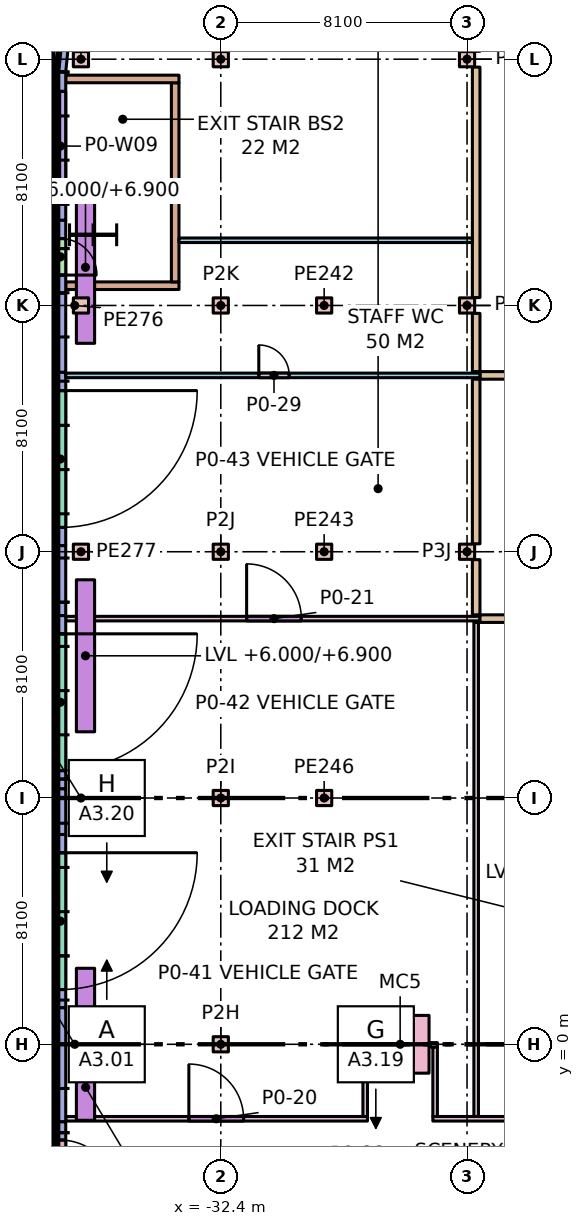
"""IFC4 building model, lengths in metres.
Left out: names, types, materials, properties, quantities, classifications, styles, units other than length and angle.
Written with IfcOpenShell. Run it as: python <this file> out.ifc"""

import sys

from ifc_helpers import new_model, si_unit, direction, frame, frame_2d, origin, origin_2d, place, context, subcontext, project, spatial, rectangle, extrude, element, fill, save


model = new_model("IFC4")
c1 = context("Model", 3, precision=1e-05, world=origin(), true_north=direction((0.0, 1.0)))
c2 = subcontext(c1, "Body", "Model", "MODEL_VIEW")
j1 = project(units=[si_unit("LENGTHUNIT", "METRE"), si_unit("PLANEANGLEUNIT", "RADIAN")], contexts=[c1])
p1 = place(None, origin())
s1 = spatial("IfcSite", under=j1, at=p1, CompositionType="ELEMENT")
p2 = place(p1, origin())
s2 = spatial("IfcBuilding", under=s1, at=p2, CompositionType="ELEMENT")
p3 = place(p2, origin())
s3 = spatial("IfcBuildingStorey", under=s2, at=p3, CompositionType="ELEMENT", Elevation=0.0)
for number, where, z_axis, x_axis in (
    (1, (-32.4, 0.0, 0.0), (0.0, 0.0, 1.0), (1.0, 0.0, 0.0)),
    (2, (-32.4, 8.1, 0.0), (0.0, 0.0, 1.0), (1.0, 0.0, 0.0)),
    (3, (-32.4, 16.2, 0.0), (0.0, 0.0, 1.0), (1.0, 0.0, 0.0)),
    (4, (-32.4, 24.3, 0.0), (0.0, 0.0, 1.0), (1.0, 0.0, 0.0)),
    (5, (-32.4, 32.4, 0.0), (0.0, 0.0, 1.0), (1.0, 0.0, 0.0)),
    (6, (-24.3, 16.2, 0.0), (0.0, 0.0, 1.0), (1.0, 0.0, 0.0)),
    (7, (-24.3, 24.3, 0.0), (0.0, 0.0, 1.0), (1.0, 0.0, 0.0)),
    (8, (-24.3, 32.4, 0.0), (0.0, 0.0, 1.0), (1.0, 0.0, 0.0)),
    (9, (-29.0, 24.3, 0.0), (0.0, 0.0, 1.0), (1.0, 0.0, 0.0)),
    (10, (-29.0, 16.2, 0.0), (0.0, 0.0, 1.0), (1.0, 0.0, 0.0)),
    (11, (-29.0, 8.1, 0.0), (0.0, 0.0, 1.0), (1.0, 0.0, 0.0)),
    (12, (-37.0, 24.3, 0.0), (0.0, 0.0, 1.0), (1.0, 0.0, 0.0)),
    (13, (-37.0, 16.2, 0.0), (0.0, 0.0, 1.0), (1.0, 0.0, 0.0)),
    (14, (-37.0, 8.1, 0.0), (0.0, 0.0, 1.0), (1.0, 0.0, 0.0)),
    (15, (-37.0, 0.0, 0.0), (0.0, 0.0, 1.0), (1.0, 0.0, 0.0)),
    (16, (-37.0, 32.4, 0.0), (0.0, 0.0, 1.0), (1.0, 0.0, 0.0)),
):
    element("IfcColumn", number, at=place(p3, frame(where, z_axis=z_axis, x_axis=x_axis)), inside=s3, PredefinedType="COLUMN", context=c2, shape_type="SweptSolid", body=[
        extrude(rectangle(XDim=0.5, YDim=0.5, at=origin_2d()), origin(), (0.0, 0.0, 1.0), 6.0),
    ])
p4 = place(p3, frame((-26.5, 0.0, 0.0), z_axis=(0.0, 0.0, 1.0), x_axis=(0.0, -1.0, 0.0)))
e17 = element("IfcColumn", 17, at=p4, inside=s3, PredefinedType="COLUMN", context=c2, shape_type="SweptSolid", body=[
    extrude(rectangle(XDim=1.9, YDim=1.9, at=origin_2d()), origin(), (0.0, 0.0, 1.0), 6.0),
])
p5 = place(p3, frame((-37.449, 34.277, 0.0), z_axis=(0.0, 0.0, 1.0), x_axis=(-0.097993192849, -0.995187085002, 0.0)))
e18 = element("IfcWall", 18, at=p5, inside=s3, PredefinedType="STANDARD", context=c2, shape_type="SweptSolid", body=[
    extrude(rectangle(XDim=2.304, YDim=0.35, at=frame_2d((1.152, 0.0))), origin(), (0.0, 0.0, 1.0), 5.68),
])
p6 = place(p3, frame((-37.675, 31.984, 0.0), z_axis=(0.0, 0.0, 1.0), x_axis=(0.0, -1.0, 0.0)))
e19 = element("IfcWall", 19, at=p6, inside=s3, PredefinedType="STANDARD", context=c2, shape_type="SweptSolid", body=[
    extrude(rectangle(XDim=4.884, YDim=0.35, at=frame_2d((2.442, 0.0))), origin(), (0.0, 0.0, 1.0), 5.68),
])
p7 = place(p6, frame((0.642, 0.0, 1.0)))
e20 = element("IfcOpeningElement", 20, at=p7, cuts=e19, PredefinedType="OPENING", context=c2, shape_type="SweptSolid", body=[
    extrude(rectangle(XDim=3.6, YDim=4.0, at=frame_2d((1.8, 2.0))), frame((0.0, 0.185, 0.0), z_axis=(0.0, -1.0, 0.0), x_axis=(1.0, 0.0, 0.0)), (0.0, 0.0, 1.0), 0.37),
])
p8 = place(p3, frame((-37.675, 27.1, 0.0), z_axis=(0.0, 0.0, 1.0), x_axis=(0.0, -1.0, 0.0)))
e21 = element("IfcWall", 21, at=p8, inside=s3, PredefinedType="STANDARD", context=c2, shape_type="SweptSolid", body=[
    extrude(rectangle(XDim=2.4, YDim=0.35, at=frame_2d((1.2, 0.0))), origin(), (0.0, 0.0, 1.0), 5.68),
])
p9 = place(p8, frame((0.6, 0.0, 0.0)))
e22 = element("IfcOpeningElement", 22, at=p9, cuts=e21, PredefinedType="OPENING", context=c2, shape_type="SweptSolid", body=[
    extrude(rectangle(XDim=1.2, YDim=2.4, at=frame_2d((0.6, 1.2))), frame((0.0, 0.185, 0.0), z_axis=(0.0, -1.0, 0.0), x_axis=(1.0, 0.0, 0.0)), (0.0, 0.0, 1.0), 0.37),
])
p10 = place(p3, frame((-37.675, 24.7, 0.0), z_axis=(0.0, 0.0, 1.0), x_axis=(0.0, -1.0, 0.0)))
e23 = element("IfcWall", 23, at=p10, inside=s3, PredefinedType="STANDARD", context=c2, shape_type="SweptSolid", body=[
    extrude(rectangle(XDim=2.6, YDim=0.35, at=frame_2d((1.3, 0.0))), origin(), (0.0, 0.0, 1.0), 5.68),
])
p11 = place(p3, frame((-37.675, 22.1, 0.0), z_axis=(0.0, 0.0, 1.0), x_axis=(0.0, -1.0, 0.0)))
e24 = element("IfcWall", 24, at=p11, inside=s3, PredefinedType="STANDARD", context=c2, shape_type="SweptSolid", body=[
    extrude(rectangle(XDim=5.7, YDim=0.35, at=frame_2d((2.85, 0.0))), origin(), (0.0, 0.0, 1.0), 5.68),
])
p12 = place(p11, frame((0.6, 0.0, 0.0)))
e25 = element("IfcOpeningElement", 25, at=p12, cuts=e24, PredefinedType="OPENING", context=c2, shape_type="SweptSolid", body=[
    extrude(rectangle(XDim=4.5, YDim=4.5, at=frame_2d((2.25, 2.25))), frame((0.0, 0.185, 0.0), z_axis=(0.0, -1.0, 0.0), x_axis=(1.0, 0.0, 0.0)), (0.0, 0.0, 1.0), 0.37),
])
p13 = place(p3, frame((-37.675, 16.4, 0.0), z_axis=(0.0, 0.0, 1.0), x_axis=(0.0, -1.0, 0.0)))
e26 = element("IfcWall", 26, at=p13, inside=s3, PredefinedType="STANDARD", context=c2, shape_type="SweptSolid", body=[
    extrude(rectangle(XDim=2.3, YDim=0.35, at=frame_2d((1.15, 0.0))), origin(), (0.0, 0.0, 1.0), 5.68),
])
p14 = place(p3, frame((-37.675, 14.1, 0.0), z_axis=(0.0, 0.0, 1.0), x_axis=(0.0, -1.0, 0.0)))
e27 = element("IfcWall", 27, at=p14, inside=s3, PredefinedType="STANDARD", context=c2, shape_type="SweptSolid", body=[
    extrude(rectangle(XDim=5.7, YDim=0.35, at=frame_2d((2.85, 0.0))), origin(), (0.0, 0.0, 1.0), 5.68),
])
p15 = place(p14, frame((0.6, 0.0, 0.0)))
e28 = element("IfcOpeningElement", 28, at=p15, cuts=e27, PredefinedType="OPENING", context=c2, shape_type="SweptSolid", body=[
    extrude(rectangle(XDim=4.5, YDim=4.5, at=frame_2d((2.25, 2.25))), frame((0.0, 0.185, 0.0), z_axis=(0.0, -1.0, 0.0), x_axis=(1.0, 0.0, 0.0)), (0.0, 0.0, 1.0), 0.37),
])
p16 = place(p3, frame((-37.675, 8.4, 0.0), z_axis=(0.0, 0.0, 1.0), x_axis=(0.0, -1.0, 0.0)))
e29 = element("IfcWall", 29, at=p16, inside=s3, PredefinedType="STANDARD", context=c2, shape_type="SweptSolid", body=[
    extrude(rectangle(XDim=1.5, YDim=0.35, at=frame_2d((0.75, 0.0))), origin(), (0.0, 0.0, 1.0), 5.68),
])
p17 = place(p3, frame((-37.675, 6.9, 0.0), z_axis=(0.0, 0.0, 1.0), x_axis=(0.0, -1.0, 0.0)))
e30 = element("IfcWall", 30, at=p17, inside=s3, PredefinedType="STANDARD", context=c2, shape_type="SweptSolid", body=[
    extrude(rectangle(XDim=5.7, YDim=0.35, at=frame_2d((2.85, 0.0))), origin(), (0.0, 0.0, 1.0), 5.68),
])
p18 = place(p17, frame((0.6, 0.0, 0.0)))
e31 = element("IfcOpeningElement", 31, at=p18, cuts=e30, PredefinedType="OPENING", context=c2, shape_type="SweptSolid", body=[
    extrude(rectangle(XDim=4.5, YDim=4.5, at=frame_2d((2.25, 2.25))), frame((0.0, 0.185, 0.0), z_axis=(0.0, -1.0, 0.0), x_axis=(1.0, 0.0, 0.0)), (0.0, 0.0, 1.0), 0.37),
])
p19 = place(p3, frame((-37.675, 1.2, 0.0), z_axis=(0.0, 0.0, 1.0), x_axis=(0.0, -1.0, 0.0)))
e32 = element("IfcWall", 32, at=p19, inside=s3, PredefinedType="STANDARD", context=c2, shape_type="SweptSolid", body=[
    extrude(rectangle(XDim=3.75, YDim=0.35, at=frame_2d((1.875, 0.0))), origin(), (0.0, 0.0, 1.0), 5.68),
])
p20 = place(p3, frame((-37.675, -2.55, 0.0), z_axis=(0.0, 0.0, 1.0), x_axis=(0.0, -1.0, 0.0)))
e33 = element("IfcWall", 33, at=p20, inside=s3, PredefinedType="STANDARD", context=c2, shape_type="SweptSolid", body=[
    extrude(rectangle(XDim=3.0, YDim=0.35, at=frame_2d((1.5, 0.0))), origin(), (0.0, 0.0, 1.0), 5.68),
])
p21 = place(p20, frame((0.6, 0.0, 0.0)))
e34 = element("IfcOpeningElement", 34, at=p21, cuts=e33, PredefinedType="OPENING", context=c2, shape_type="SweptSolid", body=[
    extrude(rectangle(XDim=1.8, YDim=2.4, at=frame_2d((0.9, 1.2))), frame((0.0, 0.185, 0.0), z_axis=(0.0, -1.0, 0.0), x_axis=(1.0, 0.0, 0.0)), (0.0, 0.0, 1.0), 0.37),
])
for number, where, z_axis, x_axis in (
    (35, (-36.85, 28.055, 6.0), (0.0, 0.0, 1.0), (0.0, -1.0, 0.0)),
    (36, (-36.85, 15.277, 6.0), (0.0, 0.0, 1.0), (0.0, -1.0, 0.0)),
    (37, (-36.85, 2.5, 6.0), (0.0, 0.0, 1.0), (0.0, -1.0, 0.0)),
):
    element("IfcWall", number, at=place(p3, frame(where, z_axis=z_axis, x_axis=x_axis)), inside=s3, PredefinedType="PARAPET", context=c2, shape_type="SweptSolid", body=[
        extrude(rectangle(XDim=5.0, YDim=0.6, at=frame_2d((2.5, 0.0))), origin(), (0.0, 0.0, 1.0), 0.9),
    ])
p22 = place(p3, frame((-37.5, 24.95, 0.0), z_axis=(0.0, 0.0, 1.0), x_axis=(1.0, 0.0, 0.0)))
e38 = element("IfcWall", 38, at=p22, inside=s3, PredefinedType="STANDARD", context=c2, shape_type="SweptSolid", body=[
    extrude(rectangle(XDim=3.725, YDim=0.25, at=frame_2d((1.863, 0.0))), origin(), (0.0, 0.0, 1.0), 5.68),
])
p23 = place(p3, frame((-33.9, 25.075, 0.0), z_axis=(0.0, 0.0, 1.0), x_axis=(0.0, 1.0, 0.0)))
e39 = element("IfcWall", 39, at=p23, inside=s3, PredefinedType="STANDARD", context=c2, shape_type="SweptSolid", body=[
    extrude(rectangle(XDim=6.55, YDim=0.25, at=frame_2d((3.275, 0.0))), origin(), (0.0, 0.0, 1.0), 5.68),
])
p24 = place(p3, frame((-37.5, 31.75, 0.0), z_axis=(0.0, 0.0, 1.0), x_axis=(1.0, 0.0, 0.0)))
e40 = element("IfcWall", 40, at=p24, inside=s3, PredefinedType="STANDARD", context=c2, shape_type="SweptSolid", body=[
    extrude(rectangle(XDim=3.725, YDim=0.25, at=frame_2d((1.863, 0.0))), origin(), (0.0, 0.0, 1.0), 5.68),
])
p25 = place(p3, frame((-23.875, 22.0, 0.0), z_axis=(0.0, 0.0, 1.0), x_axis=(1.0, 0.0, 0.0)))
e41 = element("IfcWall", 41, at=p25, inside=s3, PredefinedType="PARTITIONING", context=c2, shape_type="SweptSolid", body=[
    extrude(rectangle(XDim=4.112, YDim=0.25, at=frame_2d((2.056, 0.0))), origin(), (0.0, 0.0, 1.0), 5.68),
])
p26 = place(p3, frame((-24.0, 22.125, 0.0), z_axis=(0.0, 0.0, 1.0), x_axis=(0.0, 1.0, 0.0)))
e42 = element("IfcWall", 42, at=p26, inside=s3, PredefinedType="PARTITIONING", context=c2, shape_type="SweptSolid", body=[
    extrude(rectangle(XDim=1.915, YDim=0.25, at=frame_2d((0.958, 0.0))), origin(), (0.0, 0.0, 1.0), 5.68),
])
p27 = place(p3, frame((-24.0, 24.56, 0.0), z_axis=(0.0, 0.0, 1.0), x_axis=(0.0, 1.0, 0.0)))
e43 = element("IfcWall", 43, at=p27, inside=s3, PredefinedType="PARTITIONING", context=c2, shape_type="SweptSolid", body=[
    extrude(rectangle(XDim=7.58, YDim=0.25, at=frame_2d((3.79, 0.0))), origin(), (0.0, 0.0, 1.0), 5.68),
])
p28 = place(p3, frame((-37.5, 14.0, 0.0), z_axis=(0.0, 0.0, 1.0), x_axis=(1.0, 0.0, 0.0)))
e44 = element("IfcWall", 44, at=p28, inside=s3, PredefinedType="PARTITIONING", context=c2, shape_type="SweptSolid", body=[
    extrude(rectangle(XDim=13.625, YDim=0.15, at=frame_2d((6.812, 0.0))), origin(), (0.0, 0.0, 1.0), 5.68),
])
p29 = place(p28, frame((5.95, 0.0, 0.0)))
e45 = element("IfcOpeningElement", 45, at=p29, cuts=e44, PredefinedType="OPENING", context=c2, shape_type="SweptSolid", body=[
    extrude(rectangle(XDim=1.8, YDim=2.4, at=frame_2d((0.9, 1.2))), frame((0.0, 0.085, 0.0), z_axis=(0.0, -1.0, 0.0), x_axis=(1.0, 0.0, 0.0)), (0.0, 0.0, 1.0), 0.17),
])
p30 = place(p3, frame((-24.0, -2.375, 0.0), z_axis=(0.0, 0.0, 1.0), x_axis=(0.0, 1.0, 0.0)))
e46 = element("IfcWall", 46, at=p30, inside=s3, PredefinedType="PARTITIONING", context=c2, shape_type="SweptSolid", body=[
    extrude(rectangle(XDim=16.25, YDim=0.15, at=frame_2d((8.125, 0.0))), origin(), (0.0, 0.0, 1.0), 5.68),
])
p31 = place(p3, frame((-37.5, -2.45, 0.0), z_axis=(0.0, 0.0, 1.0), x_axis=(1.0, 0.0, 0.0)))
e47 = element("IfcWall", 47, at=p31, inside=s3, PredefinedType="PARTITIONING", context=c2, shape_type="SweptSolid", body=[
    extrude(rectangle(XDim=9.925, YDim=0.15, at=frame_2d((4.962, 0.0))), origin(), (0.0, 0.0, 1.0), 5.68),
])
p32 = place(p31, frame((4.05, 0.0, 0.0)))
e48 = element("IfcOpeningElement", 48, at=p32, cuts=e47, PredefinedType="OPENING", context=c2, shape_type="SweptSolid", body=[
    extrude(rectangle(XDim=1.8, YDim=2.4, at=frame_2d((0.9, 1.2))), frame((0.0, 0.085, 0.0), z_axis=(0.0, -1.0, 0.0), x_axis=(1.0, 0.0, 0.0)), (0.0, 0.0, 1.0), 0.17),
])
p33 = place(p3, frame((-25.425, -2.45, 0.0), z_axis=(0.0, 0.0, 1.0), x_axis=(1.0, 0.0, 0.0)))
e49 = element("IfcWall", 49, at=p33, inside=s3, PredefinedType="PARTITIONING", context=c2, shape_type="SweptSolid", body=[
    extrude(rectangle(XDim=8.7, YDim=0.15, at=frame_2d((4.35, 0.0))), origin(), (0.0, 0.0, 1.0), 5.68),
])
for number, where, z_axis, x_axis in (
    (50, (-27.725, -0.02, 0.0), (0.0, 0.0, 1.0), (1.0, 0.0, 0.0)),
    (51, (-25.54, -0.02, 0.0), (0.0, 0.0, 1.0), (1.0, 0.0, 0.0)),
):
    element("IfcWall", number, at=place(p3, frame(where, z_axis=z_axis, x_axis=x_axis)), inside=s3, PredefinedType="PARTITIONING", context=c2, shape_type="SweptSolid", body=[
        extrude(rectangle(XDim=0.265, YDim=0.15, at=frame_2d((0.133, 0.0))), origin(), (0.0, 0.0, 1.0), 5.68),
    ])
for number, where, z_axis, x_axis in (
    (52, (-27.65, -2.375, 0.0), (0.0, 0.0, 1.0), (0.0, 1.0, 0.0)),
    (53, (-25.35, -2.375, 0.0), (0.0, 0.0, 1.0), (0.0, 1.0, 0.0)),
):
    element("IfcWall", number, at=place(p3, frame(where, z_axis=z_axis, x_axis=x_axis)), inside=s3, PredefinedType="PARTITIONING", context=c2, shape_type="SweptSolid", body=[
        extrude(rectangle(XDim=2.28, YDim=0.15, at=frame_2d((1.14, 0.0))), origin(), (0.0, 0.0, 1.0), 5.68),
    ])
p34 = place(p3, frame((-24.0, 14.125, 0.0), z_axis=(0.0, 0.0, 1.0), x_axis=(0.0, 1.0, 0.0)))
e54 = element("IfcWall", 54, at=p34, inside=s3, PredefinedType="PARTITIONING", context=c2, shape_type="SweptSolid", body=[
    extrude(rectangle(XDim=1.815, YDim=0.25, at=frame_2d((0.907, 0.0))), origin(), (0.0, 0.0, 1.0), 5.68),
])
p35 = place(p3, frame((-24.0, 16.46, 0.0), z_axis=(0.0, 0.0, 1.0), x_axis=(0.0, 1.0, 0.0)))
e55 = element("IfcWall", 55, at=p35, inside=s3, PredefinedType="PARTITIONING", context=c2, shape_type="SweptSolid", body=[
    extrude(rectangle(XDim=5.415, YDim=0.25, at=frame_2d((2.708, 0.0))), origin(), (0.0, 0.0, 1.0), 5.68),
])
p36 = place(p3, frame((-23.875, 14.0, 0.0), z_axis=(0.0, 0.0, 1.0), x_axis=(1.0, 0.0, 0.0)))
e56 = element("IfcWall", 56, at=p36, inside=s3, PredefinedType="PARTITIONING", context=c2, shape_type="SweptSolid", body=[
    extrude(rectangle(XDim=7.0, YDim=0.25, at=frame_2d((3.5, 0.0))), origin(), (0.0, 0.0, 1.0), 5.68),
])
p37 = place(p3, frame((-37.5, 22.0, 0.0), z_axis=(0.0, 0.0, 1.0), x_axis=(1.0, 0.0, 0.0)))
e57 = element("IfcWall", 57, at=p37, inside=s3, PredefinedType="PARTITIONING", context=c2, shape_type="SweptSolid", body=[
    extrude(rectangle(XDim=13.625, YDim=0.15, at=frame_2d((6.812, 0.0))), origin(), (0.0, 0.0, 1.0), 5.68),
])
p38 = place(p37, frame((6.35, 0.0, 0.0)))
e58 = element("IfcOpeningElement", 58, at=p38, cuts=e57, PredefinedType="OPENING", context=c2, shape_type="SweptSolid", body=[
    extrude(rectangle(XDim=1.0, YDim=2.1, at=frame_2d((0.5, 1.05))), frame((0.0, 0.085, 0.0), z_axis=(0.0, -1.0, 0.0), x_axis=(1.0, 0.0, 0.0)), (0.0, 0.0, 1.0), 0.17),
])
p39 = place(p3, frame((-33.775, 26.444, 0.0), z_axis=(0.0, 0.0, 1.0), x_axis=(1.0, 0.0, 0.0)))
e59 = element("IfcWall", 59, at=p39, inside=s3, PredefinedType="PARTITIONING", context=c2, shape_type="SweptSolid", body=[
    extrude(rectangle(XDim=9.65, YDim=0.15, at=frame_2d((4.825, 0.0))), origin(), (0.0, 0.0, 1.0), 5.68),
])
p40 = place(p7, origin())
e60 = element("IfcWindow", 60, at=p40, inside=s3, PartitioningType="SINGLE_PANEL", PredefinedType="WINDOW", context=c2, shape_type="SweptSolid", body=[
    extrude(rectangle(XDim=3.6, YDim=4.0, at=frame_2d((1.8, 2.0))), frame((0.0, 0.03, 0.0), z_axis=(0.0, -1.0, 0.0), x_axis=(1.0, 0.0, 0.0)), (0.0, 0.0, 1.0), 0.06),
])
fill(e20, e60)
p41 = place(p32, origin())
e61 = element("IfcDoor", 61, at=p41, inside=s3, OperationType="SINGLE_SWING_LEFT", PredefinedType="DOOR", context=c2, shape_type="SweptSolid", body=[
    extrude(rectangle(XDim=1.8, YDim=2.4, at=frame_2d((0.9, 1.2))), frame((0.0, 0.025, 0.0), z_axis=(0.0, -1.0, 0.0), x_axis=(1.0, 0.0, 0.0)), (0.0, 0.0, 1.0), 0.05),
])
fill(e48, e61)
p42 = place(p29, origin())
e62 = element("IfcDoor", 62, at=p42, inside=s3, OperationType="SINGLE_SWING_LEFT", PredefinedType="DOOR", context=c2, shape_type="SweptSolid", body=[
    extrude(rectangle(XDim=1.8, YDim=2.4, at=frame_2d((0.9, 1.2))), frame((0.0, 0.025, 0.0), z_axis=(0.0, -1.0, 0.0), x_axis=(1.0, 0.0, 0.0)), (0.0, 0.0, 1.0), 0.05),
])
fill(e45, e62)
p43 = place(p38, origin())
e63 = element("IfcDoor", 63, at=p43, inside=s3, OperationType="SINGLE_SWING_LEFT", PredefinedType="DOOR", context=c2, shape_type="SweptSolid", body=[
    extrude(rectangle(XDim=1.0, YDim=2.1, at=frame_2d((0.5, 1.05))), frame((0.0, 0.025, 0.0), z_axis=(0.0, -1.0, 0.0), x_axis=(1.0, 0.0, 0.0)), (0.0, 0.0, 1.0), 0.05),
])
fill(e58, e63)
p44 = place(p18, frame((4.5, 0.0, 0.0), z_axis=(0.0, 0.0, 1.0), x_axis=(-1.0, 0.0, 0.0)))
e64 = element("IfcDoor", 64, at=p44, inside=s3, OperationType="SINGLE_SWING_LEFT", PredefinedType="GATE", context=c2, shape_type="SweptSolid", body=[
    extrude(rectangle(XDim=4.5, YDim=4.5, at=frame_2d((2.25, 2.25))), frame((0.0, 0.025, 0.0), z_axis=(0.0, -1.0, 0.0), x_axis=(1.0, 0.0, 0.0)), (0.0, 0.0, 1.0), 0.05),
])
fill(e31, e64)
p45 = place(p15, frame((4.5, 0.0, 0.0), z_axis=(0.0, 0.0, 1.0), x_axis=(-1.0, 0.0, 0.0)))
e65 = element("IfcDoor", 65, at=p45, inside=s3, OperationType="SINGLE_SWING_LEFT", PredefinedType="GATE", context=c2, shape_type="SweptSolid", body=[
    extrude(rectangle(XDim=4.5, YDim=4.5, at=frame_2d((2.25, 2.25))), frame((0.0, 0.025, 0.0), z_axis=(0.0, -1.0, 0.0), x_axis=(1.0, 0.0, 0.0)), (0.0, 0.0, 1.0), 0.05),
])
fill(e28, e65)
p46 = place(p12, frame((4.5, 0.0, 0.0), z_axis=(0.0, 0.0, 1.0), x_axis=(-1.0, 0.0, 0.0)))
e66 = element("IfcDoor", 66, at=p46, inside=s3, OperationType="SINGLE_SWING_LEFT", PredefinedType="GATE", context=c2, shape_type="SweptSolid", body=[
    extrude(rectangle(XDim=4.5, YDim=4.5, at=frame_2d((2.25, 2.25))), frame((0.0, 0.025, 0.0), z_axis=(0.0, -1.0, 0.0), x_axis=(1.0, 0.0, 0.0)), (0.0, 0.0, 1.0), 0.05),
])
fill(e25, e66)
p47 = place(p21, frame((1.8, 0.0, 0.0), z_axis=(0.0, 0.0, 1.0), x_axis=(-1.0, 0.0, 0.0)))
e67 = element("IfcDoor", 67, at=p47, inside=s3, OperationType="SINGLE_SWING_RIGHT", PredefinedType="DOOR", context=c2, shape_type="SweptSolid", body=[
    extrude(rectangle(XDim=1.8, YDim=2.4, at=frame_2d((0.9, 1.2))), frame((0.0, 0.025, 0.0), z_axis=(0.0, -1.0, 0.0), x_axis=(1.0, 0.0, 0.0)), (0.0, 0.0, 1.0), 0.05),
])
fill(e34, e67)
p48 = place(p9, frame((1.2, 0.0, 0.0), z_axis=(0.0, 0.0, 1.0), x_axis=(-1.0, 0.0, 0.0)))
e68 = element("IfcDoor", 68, at=p48, inside=s3, OperationType="SINGLE_SWING_RIGHT", PredefinedType="DOOR", context=c2, shape_type="SweptSolid", body=[
    extrude(rectangle(XDim=1.2, YDim=2.4, at=frame_2d((0.6, 1.2))), frame((0.0, 0.025, 0.0), z_axis=(0.0, -1.0, 0.0), x_axis=(1.0, 0.0, 0.0)), (0.0, 0.0, 1.0), 0.05),
])
fill(e22, e68)
save(model, sys.argv[1])
